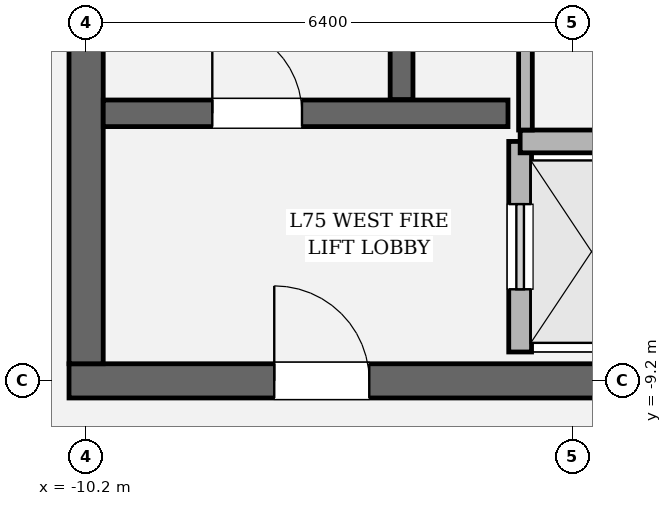
"""IFC4 building model, lengths in metres.
Left out: names, types, materials, properties, quantities, classifications, styles, units other than length and angle.
Written with IfcOpenShell. Run it as: python <this file> out.ifc"""

import sys

from ifc_helpers import new_model, si_unit, direction, frame, frame_2d, origin, place, context, subcontext, project, spatial, rectangle, extrude, element, fill, save


model = new_model("IFC4")
c1 = context("Model", 3, precision=1e-05, world=origin(), true_north=direction((0.0, 1.0)))
c2 = subcontext(c1, "Body", "Model", "MODEL_VIEW")
j1 = project(units=[si_unit("LENGTHUNIT", "METRE"), si_unit("PLANEANGLEUNIT", "RADIAN")], contexts=[c1])
p1 = place(None, origin())
s1 = spatial("IfcSite", under=j1, at=p1, CompositionType="ELEMENT")
p2 = place(p1, origin())
s2 = spatial("IfcBuilding", under=s1, at=p2, CompositionType="ELEMENT")
p3 = place(p2, frame((0.0, 0.0, 317.4)))
s3 = spatial("IfcBuildingStorey", under=s2, at=p3, CompositionType="ELEMENT", Elevation=317.4)
p4 = place(p3, frame((10.425, -9.2, 0.0), z_axis=(0.0, 0.0, 1.0), x_axis=(-1.0, 0.0, 0.0)))
e1 = element("IfcWall", 1, at=p4, inside=s3, PredefinedType="SHEAR", context=c2, shape_type="SweptSolid", body=[
    extrude(rectangle(XDim=20.85, YDim=0.45, at=frame_2d((10.425, 0.0))), origin(), (0.0, 0.0, 1.0), 4.2),
])
p5 = place(p4, frame((2.7, 0.0, 0.0)))
e2 = element("IfcOpeningElement", 2, at=p5, cuts=e1, PredefinedType="OPENING", context=c2, shape_type="SweptSolid", body=[
    extrude(rectangle(XDim=1.25, YDim=2.25, at=frame_2d((0.625, 1.125))), frame((0.0, 0.235, 0.0), z_axis=(0.0, -1.0, 0.0), x_axis=(1.0, 0.0, 0.0)), (0.0, 0.0, 1.0), 0.47),
])
p6 = place(p4, frame((16.9, 0.0, 0.0)))
e3 = element("IfcOpeningElement", 3, at=p6, cuts=e1, PredefinedType="OPENING", context=c2, shape_type="SweptSolid", body=[
    extrude(rectangle(XDim=1.25, YDim=2.25, at=frame_2d((0.625, 1.125))), frame((0.0, 0.235, 0.0), z_axis=(0.0, -1.0, 0.0), x_axis=(1.0, 0.0, 0.0)), (0.0, 0.0, 1.0), 0.47),
])
p7 = place(p3, frame((-10.2, -8.975, 0.0), z_axis=(0.0, 0.0, 1.0), x_axis=(0.0, 1.0, 0.0)))
e4 = element("IfcWall", 4, at=p7, inside=s3, PredefinedType="SHEAR", context=c2, shape_type="SweptSolid", body=[
    extrude(rectangle(XDim=17.95, YDim=0.45, at=frame_2d((8.975, 0.0))), origin(), (0.0, 0.0, 1.0), 4.2),
])
p8 = place(p7, frame((12.765, 0.0, 0.0)))
e5 = element("IfcOpeningElement", 5, at=p8, cuts=e4, PredefinedType="OPENING", context=c2, shape_type="SweptSolid", body=[
    extrude(rectangle(XDim=1.18, YDim=2.2, at=frame_2d((0.59, 1.1))), frame((0.0, 0.235, 0.0), z_axis=(0.0, -1.0, 0.0), x_axis=(1.0, 0.0, 0.0)), (0.0, 0.0, 1.0), 0.47),
])
p9 = place(p3, frame((-6.05, -5.5, 0.0), z_axis=(0.0, 0.0, 1.0), x_axis=(0.0, 1.0, 0.0)))
e6 = element("IfcWall", 6, at=p9, inside=s3, PredefinedType="SOLIDWALL", context=c2, shape_type="SweptSolid", body=[
    extrude(rectangle(XDim=8.95, YDim=0.3, at=frame_2d((4.475, 0.0))), origin(), (0.0, 0.0, 1.0), 4.2),
])
p10 = place(p3, frame((-9.975, -5.68, 0.0), z_axis=(0.0, 0.0, 1.0), x_axis=(1.0, 0.0, 0.0)))
e7 = element("IfcWall", 7, at=p10, inside=s3, PredefinedType="SOLIDWALL", context=c2, shape_type="SweptSolid", body=[
    extrude(rectangle(XDim=5.325, YDim=0.35, at=frame_2d((2.663, 0.0))), origin(), (0.0, 0.0, 1.0), 4.2),
])
p11 = place(p10, frame((1.435, 0.0, 0.0)))
e8 = element("IfcOpeningElement", 8, at=p11, cuts=e7, PredefinedType="OPENING", context=c2, shape_type="SweptSolid", body=[
    extrude(rectangle(XDim=1.18, YDim=2.2, at=frame_2d((0.59, 1.1))), frame((0.0, 0.185, 0.0), z_axis=(0.0, -1.0, 0.0), x_axis=(1.0, 0.0, 0.0)), (0.0, 0.0, 1.0), 0.37),
])
p12 = place(p3, frame((-4.49, -8.82, 0.0), z_axis=(0.0, 0.0, 1.0), x_axis=(0.0, 1.0, 0.0)))
e9 = element("IfcWall", 9, at=p12, inside=s3, PredefinedType="SOLIDWALL", context=c2, shape_type="SweptSolid", body=[
    extrude(rectangle(XDim=2.77, YDim=0.3, at=frame_2d((1.385, 0.0))), origin(), (0.0, 0.0, 1.0), 4.0),
])
p13 = place(p12, frame((0.825, 0.0, 0.0)))
e10 = element("IfcOpeningElement", 10, at=p13, cuts=e9, PredefinedType="OPENING", context=c2, shape_type="SweptSolid", body=[
    extrude(rectangle(XDim=1.12, YDim=2.25, at=frame_2d((0.56, 1.125))), frame((0.0, 0.16, 0.0), z_axis=(0.0, -1.0, 0.0), x_axis=(1.0, 0.0, 0.0)), (0.0, 0.0, 1.0), 0.32),
])
p14 = place(p3, frame((-4.49, -6.05, 0.0), z_axis=(0.0, 0.0, 1.0), x_axis=(1.0, 0.0, 0.0)))
e11 = element("IfcWall", 11, at=p14, inside=s3, PredefinedType="SOLIDWALL", context=c2, shape_type="SweptSolid", body=[
    extrude(rectangle(XDim=1.88, YDim=0.3, at=frame_2d((0.94, 0.0))), origin(), (0.0, 0.0, 1.0), 4.0),
])
p15 = place(p3, frame((-4.42, -4.16, 0.0), z_axis=(0.0, 0.0, 1.0), x_axis=(0.0, -1.0, 0.0)))
e12 = element("IfcWall", 12, at=p15, inside=s3, PredefinedType="PARTITIONING", context=c2, shape_type="SweptSolid", body=[
    extrude(rectangle(XDim=1.74, YDim=0.18, at=frame_2d((0.87, 0.0))), origin(), (0.0, 0.0, 1.0), 4.0),
])
p16 = place(p11, origin())
e13 = element("IfcDoor", 13, at=p16, inside=s3, OperationType="SINGLE_SWING_LEFT", PredefinedType="DOOR", context=c2, shape_type="SweptSolid", body=[
    extrude(rectangle(XDim=1.18, YDim=2.2, at=frame_2d((0.59, 1.1))), frame((0.0, 0.025, 0.0), z_axis=(0.0, -1.0, 0.0), x_axis=(1.0, 0.0, 0.0)), (0.0, 0.0, 1.0), 0.05),
])
fill(e8, e13)
p17 = place(p6, origin())
e14 = element("IfcDoor", 14, at=p17, inside=s3, OperationType="SINGLE_SWING_RIGHT", PredefinedType="DOOR", context=c2, shape_type="SweptSolid", body=[
    extrude(rectangle(XDim=1.25, YDim=2.25, at=frame_2d((0.625, 1.125))), frame((0.0, 0.025, 0.0), z_axis=(0.0, -1.0, 0.0), x_axis=(1.0, 0.0, 0.0)), (0.0, 0.0, 1.0), 0.05),
])
fill(e3, e14)
p18 = place(p13, origin())
e15 = element("IfcDoor", 15, at=p18, inside=s3, OperationType="SLIDING_TO_LEFT", PredefinedType="DOOR", context=c2, shape_type="SweptSolid", body=[
    extrude(rectangle(XDim=1.12, YDim=2.25, at=frame_2d((0.56, 1.125))), frame((0.0, 0.025, 0.0), z_axis=(0.0, -1.0, 0.0), x_axis=(1.0, 0.0, 0.0)), (0.0, 0.0, 1.0), 0.05),
])
fill(e10, e15)
save(model, sys.argv[1])
